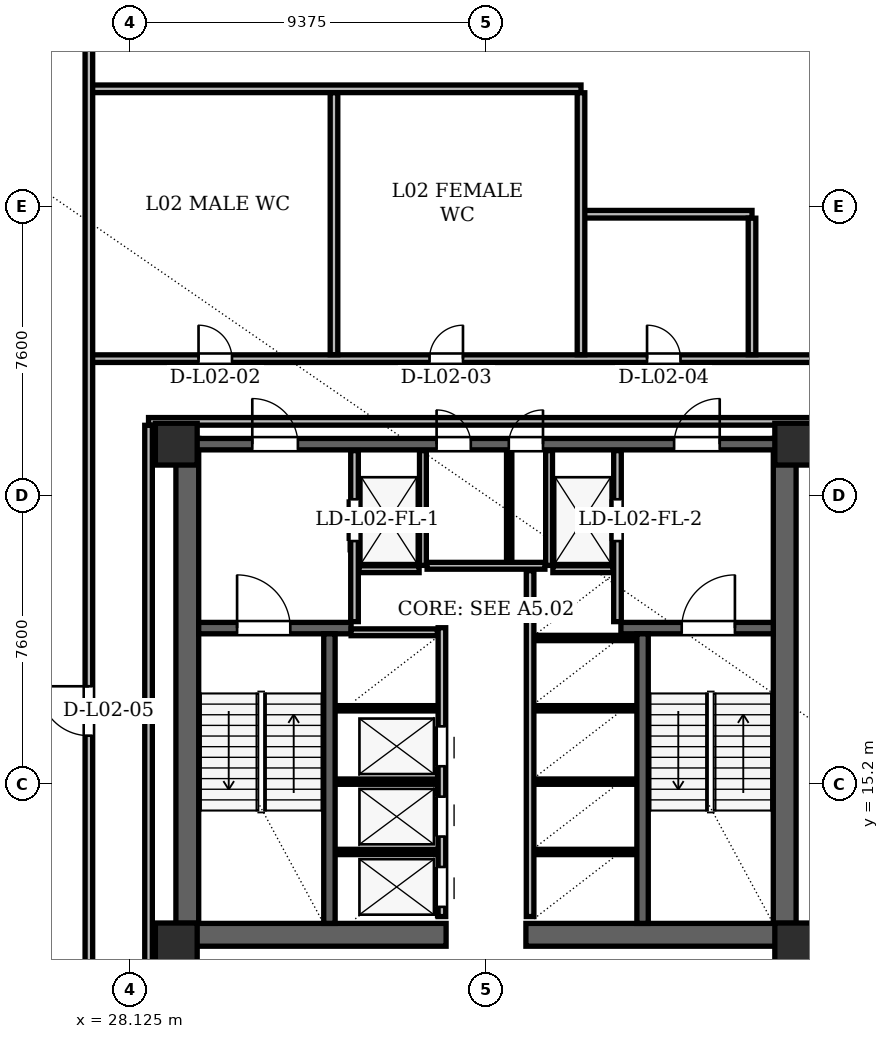
"""IFC4 building model, lengths in metres.
Left out: names, types, materials, properties, quantities, classifications, styles, units other than length and angle.
Written with IfcOpenShell. Run it as: python <this file> out.ifc"""

import sys

from ifc_helpers import new_model, si_unit, direction, frame, frame_2d, origin, origin_2d, place, context, subcontext, project, spatial, rectangle, hollow_rectangle, extrude, element, fill, save


model = new_model("IFC4")
c1 = context("Model", 3, precision=1e-05, world=origin(), true_north=direction((0.0, 1.0)))
c2 = subcontext(c1, "Body", "Model", "MODEL_VIEW")
j1 = project(units=[si_unit("LENGTHUNIT", "METRE"), si_unit("PLANEANGLEUNIT", "RADIAN")], contexts=[c1])
p1 = place(None, origin())
s1 = spatial("IfcSite", under=j1, at=p1, CompositionType="ELEMENT")
p2 = place(p1, origin())
s2 = spatial("IfcBuilding", under=s1, at=p2, CompositionType="ELEMENT")
p3 = place(p2, frame((0.0, 0.0, 9.9)))
s3 = spatial("IfcBuildingStorey", under=s2, at=p3, CompositionType="ELEMENT", Elevation=9.9)
for number, where, z_axis, x_axis in (
    (1, (29.35, 11.0, 0.0), (0.0, 0.0, 1.0), (1.0, 0.0, 0.0)),
    (2, (45.65, 11.0, 0.0), (0.0, 0.0, 1.0), (1.0, 0.0, 0.0)),
    (3, (45.65, 24.15, 0.0), (0.0, 0.0, 1.0), (1.0, 0.0, 0.0)),
    (4, (29.35, 24.15, 0.0), (0.0, 0.0, 1.0), (1.0, 0.0, 0.0)),
):
    element("IfcColumn", number, at=place(p3, frame(where, z_axis=z_axis, x_axis=x_axis)), inside=s3, PredefinedType="COLUMN", context=c2, shape_type="SweptSolid", body=[
        extrude(hollow_rectangle(XDim=1.1, YDim=1.1, WallThickness=0.09, at=origin_2d()), origin(), (0.0, 0.0, 1.0), 4.2),
    ])
for number, where, z_axis, x_axis in (
    (5, (29.64, 11.0, 0.0), (0.0, 0.0, 1.0), (0.0, 1.0, 0.0)),
    (6, (45.36, 11.0, 0.0), (0.0, 0.0, 1.0), (0.0, 1.0, 0.0)),
):
    element("IfcWall", number, at=place(p3, frame(where, z_axis=z_axis, x_axis=x_axis)), inside=s3, PredefinedType="SHEAR", context=c2, shape_type="SweptSolid", body=[
        extrude(rectangle(XDim=13.3, YDim=0.6, at=frame_2d((6.65, 0.0))), origin(), (0.0, 0.0, 1.0), 3.92),
    ])
for number, where, z_axis, x_axis in (
    (7, (29.35, 11.24, 0.0), (0.0, 0.0, 1.0), (1.0, 0.0, 0.0)),
    (8, (38.55, 11.24, 0.0), (0.0, 0.0, 1.0), (1.0, 0.0, 0.0)),
):
    element("IfcWall", number, at=place(p3, frame(where, z_axis=z_axis, x_axis=x_axis)), inside=s3, PredefinedType="SHEAR", context=c2, shape_type="SweptSolid", body=[
        extrude(rectangle(XDim=7.1, YDim=0.6, at=frame_2d((3.55, 0.0))), origin(), (0.0, 0.0, 1.0), 3.92),
    ])
p4 = place(p3, frame((29.65, 24.15, 0.0), z_axis=(0.0, 0.0, 1.0), x_axis=(1.0, 0.0, 0.0)))
e9 = element("IfcWall", 9, at=p4, inside=s3, PredefinedType="SHEAR", context=c2, shape_type="SweptSolid", body=[
    extrude(rectangle(XDim=15.7, YDim=0.3, at=frame_2d((7.85, 0.0))), origin(), (0.0, 0.0, 1.0), 3.92),
])
p5 = place(p4, frame((1.7, 0.0, 0.0)))
e10 = element("IfcOpeningElement", 10, at=p5, cuts=e9, PredefinedType="OPENING", context=c2, shape_type="SweptSolid", body=[
    extrude(rectangle(XDim=1.2, YDim=2.2, at=frame_2d((0.6, 1.1))), frame((0.0, 0.15, 0.0), z_axis=(0.0, -1.0, 0.0), x_axis=(1.0, 0.0, 0.0)), (0.0, 0.0, 1.0), 0.3),
])
p6 = place(p4, frame((12.8, 0.0, 0.0)))
e11 = element("IfcOpeningElement", 11, at=p6, cuts=e9, PredefinedType="OPENING", context=c2, shape_type="SweptSolid", body=[
    extrude(rectangle(XDim=1.2, YDim=2.2, at=frame_2d((0.6, 1.1))), frame((0.0, 0.15, 0.0), z_axis=(0.0, -1.0, 0.0), x_axis=(1.0, 0.0, 0.0)), (0.0, 0.0, 1.0), 0.3),
])
p7 = place(p4, frame((6.55, 0.0, 0.0)))
e12 = element("IfcOpeningElement", 12, at=p7, cuts=e9, PredefinedType="OPENING", context=c2, shape_type="SweptSolid", body=[
    extrude(rectangle(XDim=0.9, YDim=2.05, at=frame_2d((0.45, 1.025))), frame((0.0, 0.15, 0.0), z_axis=(0.0, -1.0, 0.0), x_axis=(1.0, 0.0, 0.0)), (0.0, 0.0, 1.0), 0.3),
])
p8 = place(p4, frame((8.45, 0.0, 0.0)))
e13 = element("IfcOpeningElement", 13, at=p8, cuts=e9, PredefinedType="OPENING", context=c2, shape_type="SweptSolid", body=[
    extrude(rectangle(XDim=0.9, YDim=2.05, at=frame_2d((0.45, 1.025))), frame((0.0, 0.15, 0.0), z_axis=(0.0, -1.0, 0.0), x_axis=(1.0, 0.0, 0.0)), (0.0, 0.0, 1.0), 0.3),
])
p9 = place(p3, frame((29.94, 19.31, 0.0), z_axis=(0.0, 0.0, 1.0), x_axis=(1.0, 0.0, 0.0)))
e14 = element("IfcWall", 14, at=p9, inside=s3, PredefinedType="SHEAR", context=c2, shape_type="SweptSolid", body=[
    extrude(rectangle(XDim=4.01, YDim=0.3, at=frame_2d((2.005, 0.0))), origin(), (0.0, 0.0, 1.0), 3.92),
])
p10 = place(p9, frame((1.01, 0.0, 0.0)))
e15 = element("IfcOpeningElement", 15, at=p10, cuts=e14, PredefinedType="OPENING", context=c2, shape_type="SweptSolid", body=[
    extrude(rectangle(XDim=1.4, YDim=2.2, at=frame_2d((0.7, 1.1))), frame((0.0, 0.15, 0.0), z_axis=(0.0, -1.0, 0.0), x_axis=(1.0, 0.0, 0.0)), (0.0, 0.0, 1.0), 0.3),
])
p11 = place(p3, frame((41.05, 19.31, 0.0), z_axis=(0.0, 0.0, 1.0), x_axis=(1.0, 0.0, 0.0)))
e16 = element("IfcWall", 16, at=p11, inside=s3, PredefinedType="SHEAR", context=c2, shape_type="SweptSolid", body=[
    extrude(rectangle(XDim=4.01, YDim=0.3, at=frame_2d((2.005, 0.0))), origin(), (0.0, 0.0, 1.0), 3.92),
])
p12 = place(p11, frame((1.6, 0.0, 0.0)))
e17 = element("IfcOpeningElement", 17, at=p12, cuts=e16, PredefinedType="OPENING", context=c2, shape_type="SweptSolid", body=[
    extrude(rectangle(XDim=1.4, YDim=2.2, at=frame_2d((0.7, 1.1))), frame((0.0, 0.15, 0.0), z_axis=(0.0, -1.0, 0.0), x_axis=(1.0, 0.0, 0.0)), (0.0, 0.0, 1.0), 0.3),
])
for number, where, z_axis, x_axis in (
    (18, (33.38, 11.54, 0.0), (0.0, 0.0, 1.0), (0.0, 1.0, 0.0)),
    (19, (41.62, 11.54, 0.0), (0.0, 0.0, 1.0), (0.0, 1.0, 0.0)),
):
    element("IfcWall", number, at=place(p3, frame(where, z_axis=z_axis, x_axis=x_axis)), inside=s3, PredefinedType="SHEAR", context=c2, shape_type="SweptSolid", body=[
        extrude(rectangle(XDim=7.62, YDim=0.3, at=frame_2d((3.81, 0.0))), origin(), (0.0, 0.0, 1.0), 3.92),
    ])
p13 = place(p3, frame((34.04, 19.48, 0.0), z_axis=(0.0, 0.0, 1.0), x_axis=(0.0, 1.0, 0.0)))
e20 = element("IfcWall", 20, at=p13, inside=s3, PredefinedType="PARTITIONING", context=c2, shape_type="SweptSolid", body=[
    extrude(rectangle(XDim=4.5, YDim=0.2, at=frame_2d((2.25, 0.0))), origin(), (0.0, 0.0, 1.0), 2.96),
])
p14 = place(p13, frame((2.12, 0.0, 0.0)))
e21 = element("IfcOpeningElement", 21, at=p14, cuts=e20, PredefinedType="OPENING", context=c2, shape_type="SweptSolid", body=[
    extrude(rectangle(XDim=1.1, YDim=2.2, at=frame_2d((0.55, 1.1))), frame((0.0, 0.1, 0.0), z_axis=(0.0, -1.0, 0.0), x_axis=(1.0, 0.0, 0.0)), (0.0, 0.0, 1.0), 0.2),
])
p15 = place(p3, frame((35.84, 20.96, 0.0), z_axis=(0.0, 0.0, 1.0), x_axis=(0.0, 1.0, 0.0)))
e22 = element("IfcWall", 22, at=p15, inside=s3, PredefinedType="PARTITIONING", context=c2, shape_type="SweptSolid", body=[
    extrude(rectangle(XDim=3.02, YDim=0.18, at=frame_2d((1.51, 0.0))), origin(), (0.0, 0.0, 1.0), 2.96),
])
p16 = place(p3, frame((34.16, 20.86, 0.0), z_axis=(0.0, 0.0, 1.0), x_axis=(1.0, 0.0, 0.0)))
e23 = element("IfcWall", 23, at=p16, inside=s3, PredefinedType="PARTITIONING", context=c2, shape_type="SweptSolid", body=[
    extrude(rectangle(XDim=1.58, YDim=0.18, at=frame_2d((0.79, 0.0))), origin(), (0.0, 0.0, 1.0), 3.92),
])
p17 = place(p3, frame((40.96, 19.48, 0.0), z_axis=(0.0, 0.0, 1.0), x_axis=(0.0, 1.0, 0.0)))
e24 = element("IfcWall", 24, at=p17, inside=s3, PredefinedType="PARTITIONING", context=c2, shape_type="SweptSolid", body=[
    extrude(rectangle(XDim=4.5, YDim=0.2, at=frame_2d((2.25, 0.0))), origin(), (0.0, 0.0, 1.0), 2.96),
])
p18 = place(p17, frame((2.12, 0.0, 0.0)))
e25 = element("IfcOpeningElement", 25, at=p18, cuts=e24, PredefinedType="OPENING", context=c2, shape_type="SweptSolid", body=[
    extrude(rectangle(XDim=1.1, YDim=2.2, at=frame_2d((0.55, 1.1))), frame((0.0, 0.1, 0.0), z_axis=(0.0, -1.0, 0.0), x_axis=(1.0, 0.0, 0.0)), (0.0, 0.0, 1.0), 0.2),
])
p19 = place(p3, frame((39.16, 20.96, 0.0), z_axis=(0.0, 0.0, 1.0), x_axis=(0.0, 1.0, 0.0)))
e26 = element("IfcWall", 26, at=p19, inside=s3, PredefinedType="PARTITIONING", context=c2, shape_type="SweptSolid", body=[
    extrude(rectangle(XDim=3.02, YDim=0.18, at=frame_2d((1.51, 0.0))), origin(), (0.0, 0.0, 1.0), 2.96),
])
p20 = place(p3, frame((39.26, 20.86, 0.0), z_axis=(0.0, 0.0, 1.0), x_axis=(1.0, 0.0, 0.0)))
e27 = element("IfcWall", 27, at=p20, inside=s3, PredefinedType="PARTITIONING", context=c2, shape_type="SweptSolid", body=[
    extrude(rectangle(XDim=1.58, YDim=0.18, at=frame_2d((0.79, 0.0))), origin(), (0.0, 0.0, 1.0), 3.92),
])
p21 = place(p3, frame((36.34, 11.72, 0.0), z_axis=(0.0, 0.0, 1.0), x_axis=(0.0, 1.0, 0.0)))
e28 = element("IfcWall", 28, at=p21, inside=s3, PredefinedType="PARTITIONING", context=c2, shape_type="SweptSolid", body=[
    extrude(rectangle(XDim=7.6, YDim=0.2, at=frame_2d((3.8, 0.0))), origin(), (0.0, 0.0, 1.0), 3.92),
])
p22 = place(p21, frame((0.255, 0.0, 0.0)))
e29 = element("IfcOpeningElement", 29, at=p22, cuts=e28, PredefinedType="OPENING", context=c2, shape_type="SweptSolid", body=[
    extrude(rectangle(XDim=1.05, YDim=2.15, at=frame_2d((0.525, 1.075))), frame((0.0, 0.1, 0.0), z_axis=(0.0, -1.0, 0.0), x_axis=(1.0, 0.0, 0.0)), (0.0, 0.0, 1.0), 0.2),
])
p23 = place(p21, frame((2.105, 0.0, 0.0)))
e30 = element("IfcOpeningElement", 30, at=p23, cuts=e28, PredefinedType="OPENING", context=c2, shape_type="SweptSolid", body=[
    extrude(rectangle(XDim=1.05, YDim=2.15, at=frame_2d((0.525, 1.075))), frame((0.0, 0.1, 0.0), z_axis=(0.0, -1.0, 0.0), x_axis=(1.0, 0.0, 0.0)), (0.0, 0.0, 1.0), 0.2),
])
p24 = place(p21, frame((3.955, 0.0, 0.0)))
e31 = element("IfcOpeningElement", 31, at=p24, cuts=e28, PredefinedType="OPENING", context=c2, shape_type="SweptSolid", body=[
    extrude(rectangle(XDim=1.05, YDim=2.15, at=frame_2d((0.525, 1.075))), frame((0.0, 0.1, 0.0), z_axis=(0.0, -1.0, 0.0), x_axis=(1.0, 0.0, 0.0)), (0.0, 0.0, 1.0), 0.2),
])
p25 = place(p3, frame((33.95, 19.2, 0.0), z_axis=(0.0, 0.0, 1.0), x_axis=(1.0, 0.0, 0.0)))
e32 = element("IfcWall", 32, at=p25, inside=s3, PredefinedType="PARTITIONING", context=c2, shape_type="SweptSolid", body=[
    extrude(rectangle(XDim=2.27, YDim=0.18, at=frame_2d((1.135, 0.0))), origin(), (0.0, 0.0, 1.0), 3.92),
])
for number, where, z_axis, x_axis in (
    (33, (33.56, 13.42, 0.0), (0.0, 0.0, 1.0), (1.0, 0.0, 0.0)),
    (34, (33.56, 15.27, 0.0), (0.0, 0.0, 1.0), (1.0, 0.0, 0.0)),
    (35, (33.56, 17.2, 0.0), (0.0, 0.0, 1.0), (1.0, 0.0, 0.0)),
):
    element("IfcWall", number, at=place(p3, frame(where, z_axis=z_axis, x_axis=x_axis)), inside=s3, PredefinedType="PARTITIONING", context=c2, shape_type="SweptSolid", body=[
        extrude(rectangle(XDim=2.66, YDim=0.14, at=frame_2d((1.33, 0.0))), origin(), (0.0, 0.0, 1.0), 3.92),
    ])
p26 = place(p3, frame((38.66, 11.72, 0.0), z_axis=(0.0, 0.0, 1.0), x_axis=(0.0, 1.0, 0.0)))
e36 = element("IfcWall", 36, at=p26, inside=s3, PredefinedType="PARTITIONING", context=c2, shape_type="SweptSolid", body=[
    extrude(rectangle(XDim=9.1, YDim=0.2, at=frame_2d((4.55, 0.0))), origin(), (0.0, 0.0, 1.0), 3.92),
])
for number, where, z_axis, x_axis in (
    (37, (38.78, 13.42, 0.0), (0.0, 0.0, 1.0), (1.0, 0.0, 0.0)),
    (38, (38.78, 15.27, 0.0), (0.0, 0.0, 1.0), (1.0, 0.0, 0.0)),
    (39, (38.78, 17.2, 0.0), (0.0, 0.0, 1.0), (1.0, 0.0, 0.0)),
    (40, (38.78, 19.05, 0.0), (0.0, 0.0, 1.0), (1.0, 0.0, 0.0)),
):
    element("IfcWall", number, at=place(p3, frame(where, z_axis=z_axis, x_axis=x_axis)), inside=s3, PredefinedType="PARTITIONING", context=c2, shape_type="SweptSolid", body=[
        extrude(rectangle(XDim=2.66, YDim=0.14, at=frame_2d((1.33, 0.0))), origin(), (0.0, 0.0, 1.0), 3.92),
    ])
p27 = place(p3, frame((35.95, 20.95, 0.0), z_axis=(0.0, 0.0, 1.0), x_axis=(1.0, 0.0, 0.0)))
e41 = element("IfcWall", 41, at=p27, inside=s3, PredefinedType="PARTITIONING", context=c2, shape_type="SweptSolid", body=[
    extrude(rectangle(XDim=3.1, YDim=0.18, at=frame_2d((1.55, 0.0))), origin(), (0.0, 0.0, 1.0), 3.92),
])
p28 = place(p3, frame((38.11, 21.06, 0.0), z_axis=(0.0, 0.0, 1.0), x_axis=(0.0, 1.0, 0.0)))
e42 = element("IfcWall", 42, at=p28, inside=s3, PredefinedType="PARTITIONING", context=c2, shape_type="SweptSolid", body=[
    extrude(rectangle(XDim=2.92, YDim=0.14, at=frame_2d((1.46, 0.0))), origin(), (0.0, 0.0, 1.0), 2.96),
])
p29 = place(p3, frame((28.62, 24.75, 0.0), z_axis=(0.0, 0.0, 1.0), x_axis=(1.0, 0.0, 0.0)))
e43 = element("IfcWall", 43, at=p29, inside=s3, PredefinedType="PARTITIONING", context=c2, shape_type="SweptSolid", body=[
    extrude(rectangle(XDim=17.76, YDim=0.2, at=frame_2d((8.88, 0.0))), origin(), (0.0, 0.0, 1.0), 2.983),
])
p30 = place(p3, frame((27.05, 26.4, 0.0), z_axis=(0.0, 0.0, 1.0), x_axis=(1.0, 0.0, 0.0)))
e44 = element("IfcWall", 44, at=p30, inside=s3, PredefinedType="PARTITIONING", context=c2, shape_type="SweptSolid", body=[
    extrude(rectangle(XDim=28.55, YDim=0.2, at=frame_2d((14.275, 0.0))), origin(), (0.0, 0.0, 1.0), 2.983),
])
p31 = place(p30, frame((2.885, 0.0, 0.0)))
e45 = element("IfcOpeningElement", 45, at=p31, cuts=e44, PredefinedType="OPENING", context=c2, shape_type="SweptSolid", body=[
    extrude(rectangle(XDim=0.88, YDim=2.08, at=frame_2d((0.44, 1.04))), frame((0.0, 0.1, 0.0), z_axis=(0.0, -1.0, 0.0), x_axis=(1.0, 0.0, 0.0)), (0.0, 0.0, 1.0), 0.2),
])
p32 = place(p30, frame((8.964, 0.0, 0.0)))
e46 = element("IfcOpeningElement", 46, at=p32, cuts=e44, PredefinedType="OPENING", context=c2, shape_type="SweptSolid", body=[
    extrude(rectangle(XDim=0.88, YDim=2.08, at=frame_2d((0.44, 1.04))), frame((0.0, 0.1, 0.0), z_axis=(0.0, -1.0, 0.0), x_axis=(1.0, 0.0, 0.0)), (0.0, 0.0, 1.0), 0.2),
])
p33 = place(p30, frame((14.688, 0.0, 0.0)))
e47 = element("IfcOpeningElement", 47, at=p33, cuts=e44, PredefinedType="OPENING", context=c2, shape_type="SweptSolid", body=[
    extrude(rectangle(XDim=0.88, YDim=2.08, at=frame_2d((0.44, 1.04))), frame((0.0, 0.1, 0.0), z_axis=(0.0, -1.0, 0.0), x_axis=(1.0, 0.0, 0.0)), (0.0, 0.0, 1.0), 0.2),
])
p34 = place(p3, frame((40.0, 30.2, 0.0), z_axis=(0.0, 0.0, 1.0), x_axis=(1.0, 0.0, 0.0)))
e48 = element("IfcWall", 48, at=p34, inside=s3, PredefinedType="PARTITIONING", context=c2, shape_type="SweptSolid", body=[
    extrude(rectangle(XDim=4.5, YDim=0.2, at=frame_2d((2.25, 0.0))), origin(), (0.0, 0.0, 1.0), 3.92),
])
p35 = place(p3, frame((27.05, 33.5, 0.0), z_axis=(0.0, 0.0, 1.0), x_axis=(1.0, 0.0, 0.0)))
e49 = element("IfcWall", 49, at=p35, inside=s3, PredefinedType="PARTITIONING", context=c2, shape_type="SweptSolid", body=[
    extrude(rectangle(XDim=12.95, YDim=0.2, at=frame_2d((6.475, 0.0))), origin(), (0.0, 0.0, 1.0), 2.983),
])
p36 = place(p3, frame((27.05, 10.504, 0.0), z_axis=(0.0, 0.0, 1.0), x_axis=(0.0, 1.0, 0.0)))
e50 = element("IfcWall", 50, at=p36, inside=s3, PredefinedType="PARTITIONING", context=c2, shape_type="SweptSolid", body=[
    extrude(rectangle(XDim=28.376, YDim=0.2, at=frame_2d((14.188, 0.0))), origin(), (0.0, 0.0, 1.0), 2.983),
])
p37 = place(p36, frame((5.975, 0.0, 0.0)))
e51 = element("IfcOpeningElement", 51, at=p37, cuts=e50, PredefinedType="OPENING", context=c2, shape_type="SweptSolid", body=[
    extrude(rectangle(XDim=1.3, YDim=2.2, at=frame_2d((0.65, 1.1))), frame((0.0, 0.1, 0.0), z_axis=(0.0, -1.0, 0.0), x_axis=(1.0, 0.0, 0.0)), (0.0, 0.0, 1.0), 0.2),
])
p38 = place(p3, frame((28.62, 10.504, 0.0), z_axis=(0.0, 0.0, 1.0), x_axis=(0.0, 1.0, 0.0)))
e52 = element("IfcWall", 52, at=p38, inside=s3, PredefinedType="PARTITIONING", context=c2, shape_type="SweptSolid", body=[
    extrude(rectangle(XDim=14.142, YDim=0.2, at=frame_2d((7.071, 0.0))), origin(), (0.0, 0.0, 1.0), 2.983),
])
for number, where, z_axis, x_axis in (
    (53, (33.5, 26.504, 0.0), (0.0, 0.0, 1.0), (0.0, 1.0, 0.0)),
    (54, (40.0, 26.504, 0.0), (0.0, 0.0, 1.0), (0.0, 1.0, 0.0)),
):
    element("IfcWall", number, at=place(p3, frame(where, z_axis=z_axis, x_axis=x_axis)), inside=s3, PredefinedType="PARTITIONING", context=c2, shape_type="SweptSolid", body=[
        extrude(rectangle(XDim=6.892, YDim=0.2, at=frame_2d((3.446, 0.0))), origin(), (0.0, 0.0, 1.0), 3.92),
    ])
p39 = place(p3, frame((44.5, 26.504, 0.0), z_axis=(0.0, 0.0, 1.0), x_axis=(0.0, 1.0, 0.0)))
e55 = element("IfcWall", 55, at=p39, inside=s3, PredefinedType="PARTITIONING", context=c2, shape_type="SweptSolid", body=[
    extrude(rectangle(XDim=3.592, YDim=0.2, at=frame_2d((1.796, 0.0))), origin(), (0.0, 0.0, 1.0), 3.92),
])
p40 = place(p14, origin())
e56 = element("IfcDoor", 56, at=p40, inside=s3, OperationType="SLIDING_TO_LEFT", PredefinedType="DOOR", context=c2, shape_type="SweptSolid", body=[
    extrude(rectangle(XDim=1.1, YDim=2.2, at=frame_2d((0.55, 1.1))), frame((0.0, 0.025, 0.0), z_axis=(0.0, -1.0, 0.0), x_axis=(1.0, 0.0, 0.0)), (0.0, 0.0, 1.0), 0.05),
])
fill(e21, e56)
p41 = place(p18, origin())
e57 = element("IfcDoor", 57, at=p41, inside=s3, OperationType="SLIDING_TO_RIGHT", PredefinedType="DOOR", context=c2, shape_type="SweptSolid", body=[
    extrude(rectangle(XDim=1.1, YDim=2.2, at=frame_2d((0.55, 1.1))), frame((0.0, 0.025, 0.0), z_axis=(0.0, -1.0, 0.0), x_axis=(1.0, 0.0, 0.0)), (0.0, 0.0, 1.0), 0.05),
])
fill(e25, e57)
p42 = place(p22, origin())
e58 = element("IfcDoor", 58, at=p42, inside=s3, OperationType="SLIDING_TO_LEFT", PredefinedType="DOOR", context=c2, shape_type="SweptSolid", body=[
    extrude(rectangle(XDim=1.05, YDim=2.15, at=frame_2d((0.525, 1.075))), frame((0.0, 0.025, 0.0), z_axis=(0.0, -1.0, 0.0), x_axis=(1.0, 0.0, 0.0)), (0.0, 0.0, 1.0), 0.05),
])
fill(e29, e58)
p43 = place(p23, origin())
e59 = element("IfcDoor", 59, at=p43, inside=s3, OperationType="SLIDING_TO_RIGHT", PredefinedType="DOOR", context=c2, shape_type="SweptSolid", body=[
    extrude(rectangle(XDim=1.05, YDim=2.15, at=frame_2d((0.525, 1.075))), frame((0.0, 0.025, 0.0), z_axis=(0.0, -1.0, 0.0), x_axis=(1.0, 0.0, 0.0)), (0.0, 0.0, 1.0), 0.05),
])
fill(e30, e59)
p44 = place(p24, origin())
e60 = element("IfcDoor", 60, at=p44, inside=s3, OperationType="SLIDING_TO_LEFT", PredefinedType="DOOR", context=c2, shape_type="SweptSolid", body=[
    extrude(rectangle(XDim=1.05, YDim=2.15, at=frame_2d((0.525, 1.075))), frame((0.0, 0.025, 0.0), z_axis=(0.0, -1.0, 0.0), x_axis=(1.0, 0.0, 0.0)), (0.0, 0.0, 1.0), 0.05),
])
fill(e31, e60)
p45 = place(p10, origin())
e61 = element("IfcDoor", 61, at=p45, inside=s3, OperationType="SINGLE_SWING_LEFT", PredefinedType="DOOR", context=c2, shape_type="SweptSolid", body=[
    extrude(rectangle(XDim=1.4, YDim=2.2, at=frame_2d((0.7, 1.1))), frame((0.0, 0.025, 0.0), z_axis=(0.0, -1.0, 0.0), x_axis=(1.0, 0.0, 0.0)), (0.0, 0.0, 1.0), 0.05),
])
fill(e15, e61)
p46 = place(p12, origin())
e62 = element("IfcDoor", 62, at=p46, inside=s3, OperationType="SINGLE_SWING_RIGHT", PredefinedType="DOOR", context=c2, shape_type="SweptSolid", body=[
    extrude(rectangle(XDim=1.4, YDim=2.2, at=frame_2d((0.7, 1.1))), frame((0.0, 0.025, 0.0), z_axis=(0.0, -1.0, 0.0), x_axis=(1.0, 0.0, 0.0)), (0.0, 0.0, 1.0), 0.05),
])
fill(e17, e62)
p47 = place(p5, origin())
e63 = element("IfcDoor", 63, at=p47, inside=s3, OperationType="SINGLE_SWING_LEFT", PredefinedType="DOOR", context=c2, shape_type="SweptSolid", body=[
    extrude(rectangle(XDim=1.2, YDim=2.2, at=frame_2d((0.6, 1.1))), frame((0.0, 0.025, 0.0), z_axis=(0.0, -1.0, 0.0), x_axis=(1.0, 0.0, 0.0)), (0.0, 0.0, 1.0), 0.05),
])
fill(e10, e63)
p48 = place(p6, origin())
e64 = element("IfcDoor", 64, at=p48, inside=s3, OperationType="SINGLE_SWING_RIGHT", PredefinedType="DOOR", context=c2, shape_type="SweptSolid", body=[
    extrude(rectangle(XDim=1.2, YDim=2.2, at=frame_2d((0.6, 1.1))), frame((0.0, 0.025, 0.0), z_axis=(0.0, -1.0, 0.0), x_axis=(1.0, 0.0, 0.0)), (0.0, 0.0, 1.0), 0.05),
])
fill(e11, e64)
p49 = place(p7, origin())
e65 = element("IfcDoor", 65, at=p49, inside=s3, OperationType="SINGLE_SWING_LEFT", PredefinedType="DOOR", context=c2, shape_type="SweptSolid", body=[
    extrude(rectangle(XDim=0.9, YDim=2.05, at=frame_2d((0.45, 1.025))), frame((0.0, 0.025, 0.0), z_axis=(0.0, -1.0, 0.0), x_axis=(1.0, 0.0, 0.0)), (0.0, 0.0, 1.0), 0.05),
])
fill(e12, e65)
p50 = place(p8, origin())
e66 = element("IfcDoor", 66, at=p50, inside=s3, OperationType="SINGLE_SWING_RIGHT", PredefinedType="DOOR", context=c2, shape_type="SweptSolid", body=[
    extrude(rectangle(XDim=0.9, YDim=2.05, at=frame_2d((0.45, 1.025))), frame((0.0, 0.025, 0.0), z_axis=(0.0, -1.0, 0.0), x_axis=(1.0, 0.0, 0.0)), (0.0, 0.0, 1.0), 0.05),
])
fill(e13, e66)
p51 = place(p31, origin())
e67 = element("IfcDoor", 67, at=p51, inside=s3, OperationType="SINGLE_SWING_LEFT", PredefinedType="DOOR", context=c2, shape_type="SweptSolid", body=[
    extrude(rectangle(XDim=0.88, YDim=2.08, at=frame_2d((0.44, 1.04))), frame((0.0, 0.025, 0.0), z_axis=(0.0, -1.0, 0.0), x_axis=(1.0, 0.0, 0.0)), (0.0, 0.0, 1.0), 0.05),
])
fill(e45, e67)
p52 = place(p32, origin())
e68 = element("IfcDoor", 68, at=p52, inside=s3, OperationType="SINGLE_SWING_RIGHT", PredefinedType="DOOR", context=c2, shape_type="SweptSolid", body=[
    extrude(rectangle(XDim=0.88, YDim=2.08, at=frame_2d((0.44, 1.04))), frame((0.0, 0.025, 0.0), z_axis=(0.0, -1.0, 0.0), x_axis=(1.0, 0.0, 0.0)), (0.0, 0.0, 1.0), 0.05),
])
fill(e46, e68)
p53 = place(p33, origin())
e69 = element("IfcDoor", 69, at=p53, inside=s3, OperationType="SINGLE_SWING_LEFT", PredefinedType="DOOR", context=c2, shape_type="SweptSolid", body=[
    extrude(rectangle(XDim=0.88, YDim=2.08, at=frame_2d((0.44, 1.04))), frame((0.0, 0.025, 0.0), z_axis=(0.0, -1.0, 0.0), x_axis=(1.0, 0.0, 0.0)), (0.0, 0.0, 1.0), 0.05),
])
fill(e47, e69)
p54 = place(p37, origin())
e70 = element("IfcDoor", 70, at=p54, inside=s3, OperationType="SINGLE_SWING_RIGHT", PredefinedType="DOOR", context=c2, shape_type="SweptSolid", body=[
    extrude(rectangle(XDim=1.3, YDim=2.2, at=frame_2d((0.65, 1.1))), frame((0.0, 0.025, 0.0), z_axis=(0.0, -1.0, 0.0), x_axis=(1.0, 0.0, 0.0)), (0.0, 0.0, 1.0), 0.05),
])
fill(e51, e70)
save(model, sys.argv[1])
